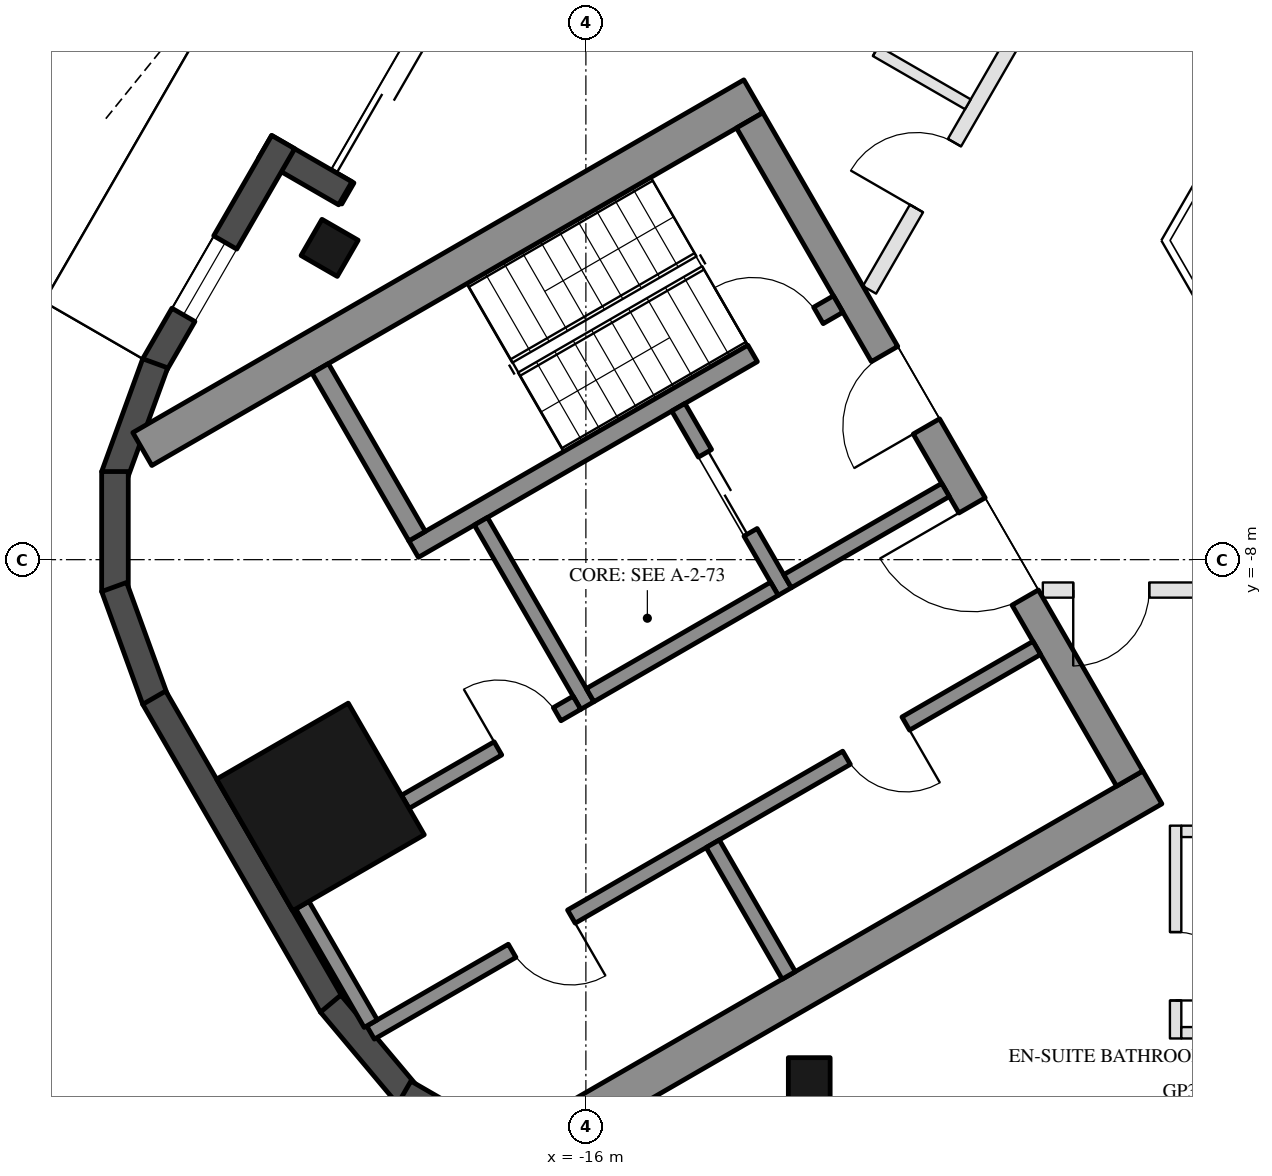
"""IFC4 building model, lengths in metres.
Left out: names, types, materials, properties, quantities, classifications, styles, units other than length and angle.
Written with IfcOpenShell. Run it as: python <this file> out.ifc"""

import sys

from ifc_helpers import new_model, si_unit, direction, frame, frame_2d, origin, origin_2d, place, context, subcontext, project, spatial, rectangle, hollow_rectangle, extrude, boolean, halfspace, element, fill, save


model = new_model("IFC4")
c1 = context("Model", 3, precision=1e-05, world=origin(), true_north=direction((0.0, 1.0)))
c2 = subcontext(c1, "Body", "Model", "MODEL_VIEW")
j1 = project(units=[si_unit("LENGTHUNIT", "METRE"), si_unit("PLANEANGLEUNIT", "RADIAN")], contexts=[c1])
p1 = place(None, origin())
s1 = spatial("IfcSite", under=j1, at=p1, CompositionType="ELEMENT")
p2 = place(p1, origin())
s2 = spatial("IfcBuilding", under=s1, at=p2, CompositionType="ELEMENT")
p3 = place(p2, frame((0.0, 0.0, 313.3)))
s3 = spatial("IfcBuildingStorey", under=s2, at=p3, CompositionType="ELEMENT", Elevation=313.3)
for number, where, z_axis, x_axis in (
    (1, (-13.061, -14.827, 0.0), (0.0, 0.0, 1.0), (-1.0, 0.0, 0.0)),
    (2, (-19.372, -3.898, 0.0), (0.0, 0.0, 1.0), (0.5, 0.866, 0.0)),
):
    element("IfcColumn", number, at=place(p3, frame(where, z_axis=z_axis, x_axis=x_axis)), inside=s3, PredefinedType="COLUMN", context=c2, shape_type="SweptSolid", body=[
        boolean("DIFFERENCE", extrude(hollow_rectangle(XDim=0.55, YDim=0.55, WallThickness=0.025, at=origin_2d()), origin(), (0.0, 0.0, 1.0), 3.7), halfspace(frame((0.0, 0.0, 0.04), z_axis=(0.0, 0.0, 1.0), x_axis=(1.0, 0.0, 0.0)), True)),
    ])
p4 = place(p3, frame((-19.492, -11.254, 0.0), z_axis=(0.0, 0.0, 1.0), x_axis=(-0.5, 0.866025403784, 0.0)))
e3 = element("IfcColumn", 3, at=p4, inside=s3, PredefinedType="COLUMN", context=c2, shape_type="SweptSolid", body=[
    boolean("DIFFERENCE", extrude(hollow_rectangle(XDim=2.0, YDim=2.0, WallThickness=0.05, at=origin_2d()), origin(), (0.0, 0.0, 1.0), 3.7), halfspace(frame((0.0, 0.0, 0.113), z_axis=(0.0, 0.0, 1.0), x_axis=(1.0, 0.0, 0.0)), True)),
])
p5 = place(p3, frame((-16.678, 1.418, 0.0), z_axis=(0.0, 0.0, 1.0), x_axis=(-0.499996591357, -0.866027371756, 0.0)))
e4 = element("IfcWall", 4, at=p5, inside=s3, PredefinedType="SOLIDWALL", context=c2, shape_type="SweptSolid", body=[
    extrude(rectangle(XDim=5.371, YDim=0.35, at=frame_2d((2.685, 0.0))), origin(), (0.0, 0.0, 1.0), 3.55),
])
p6 = place(p5, frame((2.651, 0.0, 0.0)))
e5 = element("IfcOpeningElement", 5, at=p6, cuts=e4, PredefinedType="OPENING", context=c2, shape_type="SweptSolid", body=[
    extrude(rectangle(XDim=2.4, YDim=2.4, at=frame_2d((1.2, 1.2))), frame((0.0, 0.185, 0.0), z_axis=(0.0, -1.0, 0.0), x_axis=(1.0, 0.0, 0.0)), (0.0, 0.0, 1.0), 0.37),
])
p7 = place(p5, frame((0.77, 0.0, 0.3)))
e6 = element("IfcOpeningElement", 6, at=p7, cuts=e4, PredefinedType="OPENING", context=c2, shape_type="SweptSolid", body=[
    extrude(rectangle(XDim=1.5, YDim=2.65, at=frame_2d((0.75, 1.325))), frame((0.0, 0.185, 0.0), z_axis=(0.0, -1.0, 0.0), x_axis=(1.0, 0.0, 0.0)), (0.0, 0.0, 1.0), 0.37),
])
p8 = place(p3, frame((-19.165, -3.18, 0.0), z_axis=(0.0, 0.0, 1.0), x_axis=(-0.866005645448, 0.500034220881, 0.0)))
e7 = element("IfcWall", 7, at=p8, inside=s3, PredefinedType="SOLIDWALL", context=c2, shape_type="SweptSolid", body=[
    extrude(rectangle(XDim=1.22, YDim=0.35, at=frame_2d((0.61, 0.0))), origin(), (0.0, 0.0, 1.0), 3.55),
])
p9 = place(p3, frame((-19.982, -2.506, 0.0), z_axis=(0.0, 0.0, 1.0), x_axis=(-0.500054617923, -0.865993867816, 0.0)))
e8 = element("IfcWall", 8, at=p9, inside=s3, PredefinedType="SOLIDWALL", context=c2, shape_type="SweptSolid", body=[
    extrude(rectangle(XDim=3.393, YDim=0.35, at=frame_2d((1.697, 0.0))), origin(), (0.0, 0.0, 1.0), 3.55),
])
p10 = place(p9, frame((1.525, 0.0, 0.3)))
e9 = element("IfcOpeningElement", 9, at=p10, cuts=e8, PredefinedType="OPENING", context=c2, shape_type="SweptSolid", body=[
    extrude(rectangle(XDim=1.1, YDim=2.65, at=frame_2d((0.55, 1.325))), frame((0.0, 0.185, 0.0), z_axis=(0.0, -1.0, 0.0), x_axis=(1.0, 0.0, 0.0)), (0.0, 0.0, 1.0), 0.37),
])
for number, where, z_axis, x_axis in (
    (10, (-21.666, -5.417, 0.0), (0.0, 0.0, 1.0), (-0.342, -0.94, 0.0)),
    (11, (-22.196, -6.841, 0.0), (0.0, 0.0, 1.0), (0.0, -1.0, 0.0)),
    (12, (-22.206, -8.36, 0.0), (0.0, 0.0, 1.0), (0.342, -0.94, 0.0)),
):
    element("IfcWall", number, at=place(p3, frame(where, z_axis=z_axis, x_axis=x_axis)), inside=s3, PredefinedType="SOLIDWALL", context=c2, shape_type="SweptSolid", body=[
        extrude(rectangle(XDim=1.579, YDim=0.35, at=frame_2d((0.79, 0.0))), origin(), (0.0, 0.0, 1.0), 3.55),
    ])
p11 = place(p3, frame((-21.679, -9.816, 0.0), z_axis=(0.0, 0.0, 1.0), x_axis=(0.500023656998, -0.86601174498, 0.0)))
e13 = element("IfcWall", 13, at=p11, inside=s3, PredefinedType="SOLIDWALL", context=c2, shape_type="SweptSolid", body=[
    extrude(rectangle(XDim=4.677, YDim=0.35, at=frame_2d((2.339, 0.0))), origin(), (0.0, 0.0, 1.0), 3.55),
])
for number, where, z_axis, x_axis in (
    (14, (-19.358, -13.842, 0.0), (0.0, 0.0, 1.0), (0.643, -0.766, 0.0)),
    (15, (-18.389, -15.012, 0.0), (0.0, 0.0, 1.0), (0.866, -0.5, 0.0)),
):
    element("IfcWall", number, at=place(p3, frame(where, z_axis=z_axis, x_axis=x_axis)), inside=s3, PredefinedType="SOLIDWALL", context=c2, shape_type="SweptSolid", body=[
        extrude(rectangle(XDim=1.579, YDim=0.35, at=frame_2d((0.79, 0.0))), origin(), (0.0, 0.0, 1.0), 3.55),
    ])
for number, where, z_axis, x_axis in (
    (16, (-13.797, -1.903, 0.0), (0.0, 0.0, 1.0), (-0.866, -0.5, 0.0)),
    (17, (-8.547, -10.997, 0.0), (0.0, 0.0, 1.0), (-0.866, -0.5, 0.0)),
):
    element("IfcWall", number, at=place(p3, frame(where, z_axis=z_axis, x_axis=x_axis)), inside=s3, PredefinedType="SHEAR", context=c2, shape_type="SweptSolid", body=[
        extrude(rectangle(XDim=9.283, YDim=0.5, at=frame_2d((4.641, 0.0))), origin(), (0.0, 0.0, 1.0), 3.5),
    ])
p12 = place(p3, frame((-13.845, -2.22, 0.0), z_axis=(0.0, 0.0, 1.0), x_axis=(0.500004234368, -0.866022959057, 0.0)))
e18 = element("IfcWall", 18, at=p12, inside=s3, PredefinedType="SHEAR", context=c2, shape_type="SweptSolid", body=[
    extrude(rectangle(XDim=10.0, YDim=0.4, at=frame_2d((5.0, 0.0))), origin(), (0.0, 0.0, 1.0), 3.5),
])
p13 = place(p12, frame((3.55, 0.0, 0.0)))
e19 = element("IfcOpeningElement", 19, at=p13, cuts=e18, PredefinedType="OPENING", context=c2, shape_type="SweptSolid", body=[
    extrude(rectangle(XDim=1.1, YDim=2.1, at=frame_2d((0.55, 1.05))), frame((0.0, 0.21, 0.0), z_axis=(0.0, -1.0, 0.0), x_axis=(1.0, 0.0, 0.0)), (0.0, 0.0, 1.0), 0.42),
])
p14 = place(p12, frame((5.85, 0.0, 0.0)))
e20 = element("IfcOpeningElement", 20, at=p14, cuts=e18, PredefinedType="OPENING", context=c2, shape_type="SweptSolid", body=[
    extrude(rectangle(XDim=1.4, YDim=2.1, at=frame_2d((0.7, 1.05))), frame((0.0, 0.21, 0.0), z_axis=(0.0, -1.0, 0.0), x_axis=(1.0, 0.0, 0.0)), (0.0, 0.0, 1.0), 0.42),
])
p15 = place(p3, frame((-12.681, -4.636, 0.0), z_axis=(0.0, 0.0, 1.0), x_axis=(-0.866021702275, -0.500006411147, 0.0)))
e21 = element("IfcWall", 21, at=p15, inside=s3, PredefinedType="SHEAR", context=c2, shape_type="SweptSolid", body=[
    extrude(rectangle(XDim=6.45, YDim=0.25, at=frame_2d((3.225, 0.0))), origin(), (0.0, 0.0, 1.0), 3.5),
])
p16 = place(p15, frame((0.3, 0.0, 0.0)))
e22 = element("IfcOpeningElement", 22, at=p16, cuts=e21, PredefinedType="OPENING", context=c2, shape_type="SweptSolid", body=[
    extrude(rectangle(XDim=1.0, YDim=2.1, at=frame_2d((0.5, 1.05))), frame((0.0, 0.135, 0.0), z_axis=(0.0, -1.0, 0.0), x_axis=(1.0, 0.0, 0.0)), (0.0, 0.0, 1.0), 0.27),
])
p17 = place(p3, frame((-19.496, -5.482, 0.0), z_axis=(0.0, 0.0, 1.0), x_axis=(0.499990435942, -0.866030925526, 0.0)))
e23 = element("IfcWall", 23, at=p17, inside=s3, PredefinedType="SHEAR", context=c2, shape_type="SweptSolid", body=[
    extrude(rectangle(XDim=2.55, YDim=0.25, at=frame_2d((1.275, 0.0))), origin(), (0.0, 0.0, 1.0), 3.5),
])
p18 = place(p3, frame((-17.381, -7.495, 0.0), z_axis=(0.0, 0.0, 1.0), x_axis=(0.500011755427, -0.866018616679, 0.0)))
e24 = element("IfcWall", 24, at=p18, inside=s3, PredefinedType="SHEAR", context=c2, shape_type="SweptSolid", body=[
    extrude(rectangle(XDim=2.8, YDim=0.2, at=frame_2d((1.4, 0.0))), origin(), (0.0, 0.0, 1.0), 3.5),
])
p19 = place(p3, frame((-14.783, -5.995, 0.0), z_axis=(0.0, 0.0, 1.0), x_axis=(0.49994636267, -0.866056369097, 0.0)))
e25 = element("IfcWall", 25, at=p19, inside=s3, PredefinedType="SHEAR", context=c2, shape_type="SweptSolid", body=[
    extrude(rectangle(XDim=2.8, YDim=0.2, at=frame_2d((1.4, 0.0))), origin(), (0.0, 0.0, 1.0), 3.5),
])
p20 = place(p19, frame((0.7, 0.0, 0.0)))
e26 = element("IfcOpeningElement", 26, at=p20, cuts=e25, PredefinedType="OPENING", context=c2, shape_type="SweptSolid", body=[
    extrude(rectangle(XDim=1.2, YDim=2.1, at=frame_2d((0.6, 1.05))), frame((0.0, 0.11, 0.0), z_axis=(0.0, -1.0, 0.0), x_axis=(1.0, 0.0, 0.0)), (0.0, 0.0, 1.0), 0.22),
])
p21 = place(p3, frame((-13.52, -8.383, 0.0), z_axis=(0.0, 0.0, 1.0), x_axis=(-0.866034573852, -0.49998411664, 0.0)))
e27 = element("IfcWall", 27, at=p21, inside=s3, PredefinedType="SHEAR", context=c2, shape_type="SweptSolid", body=[
    extrude(rectangle(XDim=2.8, YDim=0.2, at=frame_2d((1.4, 0.0))), origin(), (0.0, 0.0, 1.0), 3.5),
])
p22 = place(p3, frame((-11.268, -7.083, 0.0), z_axis=(0.0, 0.0, 1.0), x_axis=(-0.866050077142, -0.499957262057, 0.0)))
e28 = element("IfcWall", 28, at=p22, inside=s3, PredefinedType="SHEAR", context=c2, shape_type="SweptSolid", body=[
    extrude(rectangle(XDim=2.4, YDim=0.2, at=frame_2d((1.2, 0.0))), origin(), (0.0, 0.0, 1.0), 3.5),
])
p23 = place(p3, frame((-10.068, -9.162, 0.0), z_axis=(0.0, 0.0, 1.0), x_axis=(-0.866030125237, -0.499991822116, 0.0)))
e29 = element("IfcWall", 29, at=p23, inside=s3, PredefinedType="SHEAR", context=c2, shape_type="SweptSolid", body=[
    extrude(rectangle(XDim=10.121, YDim=0.2, at=frame_2d((5.061, 0.0))), origin(), (0.0, 0.0, 1.0), 3.5),
])
p24 = place(p23, frame((1.99, 0.0, 0.0)))
e30 = element("IfcOpeningElement", 30, at=p24, cuts=e29, PredefinedType="OPENING", context=c2, shape_type="SweptSolid", body=[
    extrude(rectangle(XDim=0.9, YDim=2.1, at=frame_2d((0.45, 1.05))), frame((0.0, 0.11, 0.0), z_axis=(0.0, -1.0, 0.0), x_axis=(1.0, 0.0, 0.0)), (0.0, 0.0, 1.0), 0.22),
])
p25 = place(p23, frame((7.07, 0.0, 0.0)))
e31 = element("IfcOpeningElement", 31, at=p25, cuts=e29, PredefinedType="OPENING", context=c2, shape_type="SweptSolid", body=[
    extrude(rectangle(XDim=0.9, YDim=2.1, at=frame_2d((0.45, 1.05))), frame((0.0, 0.11, 0.0), z_axis=(0.0, -1.0, 0.0), x_axis=(1.0, 0.0, 0.0)), (0.0, 0.0, 1.0), 0.22),
])
p26 = place(p3, frame((-19.73, -12.546, 0.0), z_axis=(0.0, 0.0, 1.0), x_axis=(0.500004188491, -0.866022985545, 0.0)))
e32 = element("IfcWall", 32, at=p26, inside=s3, PredefinedType="SHEAR", context=c2, shape_type="SweptSolid", body=[
    extrude(rectangle(XDim=1.8, YDim=0.2, at=frame_2d((0.9, 0.0))), origin(), (0.0, 0.0, 1.0), 3.5),
])
p27 = place(p3, frame((-16.118, -9.883, 0.0), z_axis=(0.0, 0.0, 1.0), x_axis=(-0.866045268016, -0.499965592563, 0.0)))
e33 = element("IfcWall", 33, at=p27, inside=s3, PredefinedType="SHEAR", context=c2, shape_type="SweptSolid", body=[
    extrude(rectangle(XDim=2.608, YDim=0.2, at=frame_2d((1.304, 0.0))), origin(), (0.0, 0.0, 1.0), 3.5),
])
p28 = place(p27, frame((0.3, 0.0, 0.0)))
e34 = element("IfcOpeningElement", 34, at=p28, cuts=e33, PredefinedType="OPENING", context=c2, shape_type="SweptSolid", body=[
    extrude(rectangle(XDim=0.9, YDim=2.1, at=frame_2d((0.45, 1.05))), frame((0.0, 0.11, 0.0), z_axis=(0.0, -1.0, 0.0), x_axis=(1.0, 0.0, 0.0)), (0.0, 0.0, 1.0), 0.22),
])
p29 = place(p3, frame((-14.331, -11.738, 0.0), z_axis=(0.0, 0.0, 1.0), x_axis=(0.499972520799, -0.866041268327, 0.0)))
e35 = element("IfcWall", 35, at=p29, inside=s3, PredefinedType="SHEAR", context=c2, shape_type="SweptSolid", body=[
    extrude(rectangle(XDim=2.0, YDim=0.2, at=frame_2d((1.0, 0.0))), origin(), (0.0, 0.0, 1.0), 3.5),
])
p30 = place(p3, frame((-6.093, -8.4, 0.0), z_axis=(0.0, 0.0, 1.0), x_axis=(-1.0, 0.0, 0.0)))
e36 = element("IfcWall", 36, at=p30, inside=s3, PredefinedType="PARTITIONING", context=c2, shape_type="SweptSolid", body=[
    extrude(rectangle(XDim=3.895, YDim=0.2, at=frame_2d((1.948, 0.0))), origin(), (0.0, 0.0, 1.0), 3.1),
])
p31 = place(p30, frame((2.495, 0.0, 0.0)))
e37 = element("IfcOpeningElement", 37, at=p31, cuts=e36, PredefinedType="OPENING", context=c2, shape_type="SweptSolid", body=[
    extrude(rectangle(XDim=1.0, YDim=2.1, at=frame_2d((0.5, 1.05))), frame((0.0, 0.11, 0.0), z_axis=(0.0, -1.0, 0.0), x_axis=(1.0, 0.0, 0.0)), (0.0, 0.0, 1.0), 0.22),
])
p32 = place(p3, frame((-8.241, -11.5, 0.0), z_axis=(0.0, 0.0, 1.0), x_axis=(0.0, -1.0, 0.0)))
e38 = element("IfcWall", 38, at=p32, inside=s3, PredefinedType="PARTITIONING", context=c2, shape_type="SweptSolid", body=[
    extrude(rectangle(XDim=2.8, YDim=0.15, at=frame_2d((1.4, 0.0))), origin(), (0.0, 0.0, 1.0), 3.55),
])
p33 = place(p32, frame((1.4, 0.0, 0.0)))
e39 = element("IfcOpeningElement", 39, at=p33, cuts=e38, PredefinedType="OPENING", context=c2, shape_type="SweptSolid", body=[
    extrude(rectangle(XDim=0.9, YDim=2.1, at=frame_2d((0.45, 1.05))), frame((0.0, 0.085, 0.0), z_axis=(0.0, -1.0, 0.0), x_axis=(1.0, 0.0, 0.0)), (0.0, 0.0, 1.0), 0.17),
])
p34 = place(p3, frame((-8.166, -14.225, 0.0), z_axis=(0.0, 0.0, 1.0), x_axis=(1.0, 0.0, 0.0)))
e40 = element("IfcWall", 40, at=p34, inside=s3, PredefinedType="PARTITIONING", context=c2, shape_type="SweptSolid", body=[
    extrude(rectangle(XDim=1.654, YDim=0.15, at=frame_2d((0.827, 0.0))), origin(), (0.0, 0.0, 1.0), 3.1),
])
p35 = place(p3, frame((-8.166, -11.575, 0.0), z_axis=(0.0, 0.0, 1.0), x_axis=(1.0, 0.0, 0.0)))
e41 = element("IfcWall", 41, at=p35, inside=s3, PredefinedType="PARTITIONING", context=c2, shape_type="SweptSolid", body=[
    extrude(rectangle(XDim=1.845, YDim=0.15, at=frame_2d((0.922, 0.0))), origin(), (0.0, 0.0, 1.0), 3.1),
])
p36 = place(p3, frame((-12.269, -4.45, 0.0), z_axis=(0.0, 0.0, 1.0), x_axis=(0.500006955494, 0.866021387991, 0.0)))
e42 = element("IfcWall", 42, at=p36, inside=s3, PredefinedType="PARTITIONING", context=c2, shape_type="SweptSolid", body=[
    extrude(rectangle(XDim=4.705, YDim=0.2, at=frame_2d((2.352, 0.0))), origin(), (0.0, 0.0, 1.0), 3.1),
])
p37 = place(p36, frame((1.237, 0.0, 0.0)))
e43 = element("IfcOpeningElement", 43, at=p37, cuts=e42, PredefinedType="OPENING", context=c2, shape_type="SweptSolid", body=[
    extrude(rectangle(XDim=1.0, YDim=2.1, at=frame_2d((0.5, 1.05))), frame((0.0, 0.11, 0.0), z_axis=(0.0, -1.0, 0.0), x_axis=(1.0, 0.0, 0.0)), (0.0, 0.0, 1.0), 0.22),
])
p38 = place(p3, frame((-13.399, -0.608, 0.0), z_axis=(0.0, 0.0, 1.0), x_axis=(0.866034573852, -0.49998411664, 0.0)))
e44 = element("IfcWall", 44, at=p38, inside=s3, PredefinedType="PARTITIONING", context=c2, shape_type="SweptSolid", body=[
    extrude(rectangle(XDim=2.8, YDim=0.15, at=frame_2d((1.4, 0.0))), origin(), (0.0, 0.0, 1.0), 3.55),
])
p39 = place(p38, frame((0.5, 0.0, 0.0)))
e45 = element("IfcOpeningElement", 45, at=p39, cuts=e44, PredefinedType="OPENING", context=c2, shape_type="SweptSolid", body=[
    extrude(rectangle(XDim=0.9, YDim=2.1, at=frame_2d((0.45, 1.05))), frame((0.0, 0.085, 0.0), z_axis=(0.0, -1.0, 0.0), x_axis=(1.0, 0.0, 0.0)), (0.0, 0.0, 1.0), 0.17),
])
p40 = place(p6, frame((2.4, 0.0, 0.0), z_axis=(0.0, 0.0, 1.0), x_axis=(-1.0, 0.0, 0.0)))
e46 = element("IfcDoor", 46, at=p40, inside=s3, OperationType="SLIDING_TO_LEFT", PredefinedType="DOOR", context=c2, shape_type="SweptSolid", body=[
    extrude(rectangle(XDim=2.4, YDim=2.4, at=frame_2d((1.2, 1.2))), frame((0.0, 0.025, 0.0), z_axis=(0.0, -1.0, 0.0), x_axis=(1.0, 0.0, 0.0)), (0.0, 0.0, 1.0), 0.05),
])
fill(e5, e46)
p41 = place(p10, origin())
e47 = element("IfcWindow", 47, at=p41, inside=s3, PartitioningType="SINGLE_PANEL", PredefinedType="WINDOW", context=c2, shape_type="SweptSolid", body=[
    extrude(rectangle(XDim=1.1, YDim=2.65, at=frame_2d((0.55, 1.325))), frame((0.0, 0.03, 0.0), z_axis=(0.0, -1.0, 0.0), x_axis=(1.0, 0.0, 0.0)), (0.0, 0.0, 1.0), 0.06),
])
fill(e9, e47)
p42 = place(p20, origin())
e48 = element("IfcDoor", 48, at=p42, inside=s3, OperationType="DOUBLE_DOOR_SLIDING", PredefinedType="DOOR", context=c2, shape_type="SweptSolid", body=[
    extrude(rectangle(XDim=1.2, YDim=2.1, at=frame_2d((0.6, 1.05))), frame((0.0, 0.025, 0.0), z_axis=(0.0, -1.0, 0.0), x_axis=(1.0, 0.0, 0.0)), (0.0, 0.0, 1.0), 0.05),
])
fill(e26, e48)
p43 = place(p24, origin())
e49 = element("IfcDoor", 49, at=p43, inside=s3, OperationType="SINGLE_SWING_LEFT", PredefinedType="DOOR", context=c2, shape_type="SweptSolid", body=[
    extrude(rectangle(XDim=0.9, YDim=2.1, at=frame_2d((0.45, 1.05))), frame((0.0, 0.025, 0.0), z_axis=(0.0, -1.0, 0.0), x_axis=(1.0, 0.0, 0.0)), (0.0, 0.0, 1.0), 0.05),
])
fill(e30, e49)
p44 = place(p25, origin())
e50 = element("IfcDoor", 50, at=p44, inside=s3, OperationType="SINGLE_SWING_LEFT", PredefinedType="DOOR", context=c2, shape_type="SweptSolid", body=[
    extrude(rectangle(XDim=0.9, YDim=2.1, at=frame_2d((0.45, 1.05))), frame((0.0, 0.025, 0.0), z_axis=(0.0, -1.0, 0.0), x_axis=(1.0, 0.0, 0.0)), (0.0, 0.0, 1.0), 0.05),
])
fill(e31, e50)
p45 = place(p28, frame((0.9, 0.0, 0.0), z_axis=(0.0, 0.0, 1.0), x_axis=(-1.0, 0.0, 0.0)))
e51 = element("IfcDoor", 51, at=p45, inside=s3, OperationType="SINGLE_SWING_LEFT", PredefinedType="DOOR", context=c2, shape_type="SweptSolid", body=[
    extrude(rectangle(XDim=0.9, YDim=2.1, at=frame_2d((0.45, 1.05))), frame((0.0, 0.025, 0.0), z_axis=(0.0, -1.0, 0.0), x_axis=(1.0, 0.0, 0.0)), (0.0, 0.0, 1.0), 0.05),
])
fill(e34, e51)
p46 = place(p13, frame((1.1, 0.0, 0.0), z_axis=(0.0, 0.0, 1.0), x_axis=(-1.0, 0.0, 0.0)))
e52 = element("IfcDoor", 52, at=p46, inside=s3, OperationType="SINGLE_SWING_LEFT", PredefinedType="DOOR", context=c2, shape_type="SweptSolid", body=[
    extrude(rectangle(XDim=1.1, YDim=2.1, at=frame_2d((0.55, 1.05))), frame((0.0, 0.025, 0.0), z_axis=(0.0, -1.0, 0.0), x_axis=(1.0, 0.0, 0.0)), (0.0, 0.0, 1.0), 0.05),
])
fill(e19, e52)
p47 = place(p14, frame((1.4, 0.0, 0.0), z_axis=(0.0, 0.0, 1.0), x_axis=(-1.0, 0.0, 0.0)))
e53 = element("IfcDoor", 53, at=p47, inside=s3, OperationType="DOUBLE_DOOR_SINGLE_SWING", PredefinedType="DOOR", context=c2, shape_type="SweptSolid", body=[
    extrude(rectangle(XDim=1.4, YDim=2.1, at=frame_2d((0.7, 1.05))), frame((0.0, 0.025, 0.0), z_axis=(0.0, -1.0, 0.0), x_axis=(1.0, 0.0, 0.0)), (0.0, 0.0, 1.0), 0.05),
])
fill(e20, e53)
p48 = place(p16, frame((1.0, 0.0, 0.0), z_axis=(0.0, 0.0, 1.0), x_axis=(-1.0, 0.0, 0.0)))
e54 = element("IfcDoor", 54, at=p48, inside=s3, OperationType="SINGLE_SWING_LEFT", PredefinedType="DOOR", context=c2, shape_type="SweptSolid", body=[
    extrude(rectangle(XDim=1.0, YDim=2.1, at=frame_2d((0.5, 1.05))), frame((0.0, 0.025, 0.0), z_axis=(0.0, -1.0, 0.0), x_axis=(1.0, 0.0, 0.0)), (0.0, 0.0, 1.0), 0.05),
])
fill(e22, e54)
p49 = place(p33, origin())
e55 = element("IfcDoor", 55, at=p49, inside=s3, OperationType="SINGLE_SWING_RIGHT", PredefinedType="DOOR", context=c2, shape_type="SweptSolid", body=[
    extrude(rectangle(XDim=0.9, YDim=2.1, at=frame_2d((0.45, 1.05))), frame((0.0, 0.025, 0.0), z_axis=(0.0, -1.0, 0.0), x_axis=(1.0, 0.0, 0.0)), (0.0, 0.0, 1.0), 0.05),
])
fill(e39, e55)
p50 = place(p31, origin())
e56 = element("IfcDoor", 56, at=p50, inside=s3, OperationType="SINGLE_SWING_RIGHT", PredefinedType="DOOR", context=c2, shape_type="SweptSolid", body=[
    extrude(rectangle(XDim=1.0, YDim=2.1, at=frame_2d((0.5, 1.05))), frame((0.0, 0.025, 0.0), z_axis=(0.0, -1.0, 0.0), x_axis=(1.0, 0.0, 0.0)), (0.0, 0.0, 1.0), 0.05),
])
fill(e37, e56)
p51 = place(p39, origin())
e57 = element("IfcDoor", 57, at=p51, inside=s3, OperationType="SINGLE_SWING_LEFT", PredefinedType="DOOR", context=c2, shape_type="SweptSolid", body=[
    extrude(rectangle(XDim=0.9, YDim=2.1, at=frame_2d((0.45, 1.05))), frame((0.0, 0.025, 0.0), z_axis=(0.0, -1.0, 0.0), x_axis=(1.0, 0.0, 0.0)), (0.0, 0.0, 1.0), 0.05),
])
fill(e45, e57)
p52 = place(p37, origin())
e58 = element("IfcDoor", 58, at=p52, inside=s3, OperationType="SINGLE_SWING_LEFT", PredefinedType="DOOR", context=c2, shape_type="SweptSolid", body=[
    extrude(rectangle(XDim=1.0, YDim=2.1, at=frame_2d((0.5, 1.05))), frame((0.0, 0.025, 0.0), z_axis=(0.0, -1.0, 0.0), x_axis=(1.0, 0.0, 0.0)), (0.0, 0.0, 1.0), 0.05),
])
fill(e43, e58)
save(model, sys.argv[1])
